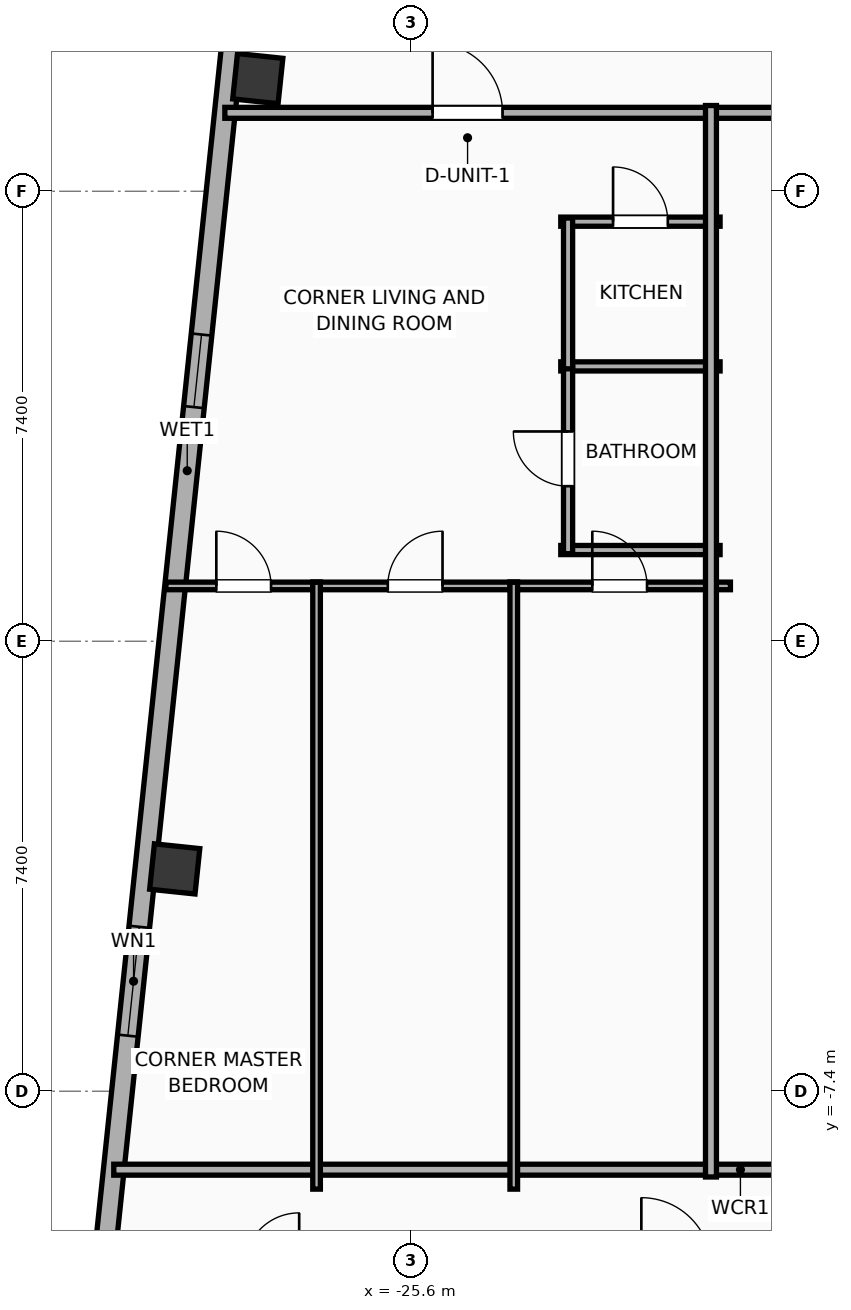
"""IFC4 building model, lengths in metres.
Left out: names, types, materials, properties, quantities, classifications, styles, units other than length and angle.
Written with IfcOpenShell. Run it as: python <this file> out.ifc"""

import sys

from ifc_helpers import new_model, si_unit, direction, frame, frame_2d, origin, origin_2d, place, context, subcontext, project, spatial, rectangle, hollow_rectangle, extrude, element, fill, save


model = new_model("IFC4")
c1 = context("Model", 3, precision=1e-05, world=origin(), true_north=direction((0.0, 1.0)))
c2 = subcontext(c1, "Body", "Model", "MODEL_VIEW")
j1 = project(units=[si_unit("LENGTHUNIT", "METRE"), si_unit("PLANEANGLEUNIT", "RADIAN")], contexts=[c1])
p1 = place(None, origin())
s1 = spatial("IfcSite", under=j1, at=p1, CompositionType="ELEMENT")
p2 = place(p1, origin())
s2 = spatial("IfcBuilding", under=s1, at=p2, CompositionType="ELEMENT")
p3 = place(p2, frame((0.0, 0.0, 267.8)))
s3 = spatial("IfcBuildingStorey", under=s2, at=p3, CompositionType="ELEMENT", Elevation=267.8)
for number, where, z_axis, x_axis in (
    (1, (-28.123, 9.252, 0.0), (0.0, 0.0, 1.0), (0.995, -0.105, 0.0)),
    (2, (-29.489, -3.744, 0.0), (0.0, 0.0, 1.0), (0.995, -0.105, 0.0)),
):
    element("IfcColumn", number, at=place(p3, frame(where, z_axis=z_axis, x_axis=x_axis)), inside=s3, PredefinedType="COLUMN", context=c2, shape_type="SweptSolid", body=[
        extrude(hollow_rectangle(XDim=0.75, YDim=0.75, WallThickness=0.025, at=origin_2d()), origin(), (0.0, 0.0, 1.0), 3.9),
    ])
p4 = place(p3, frame((-30.87, -12.296, 0.0), z_axis=(0.0, 0.0, 1.0), x_axis=(0.104533282919, 0.994521388791, 0.0)))
e3 = element("IfcWall", 3, at=p4, inside=s3, PredefinedType="ELEMENTEDWALL", context=c2, shape_type="SweptSolid", body=[
    extrude(rectangle(XDim=30.366, YDim=0.34, at=frame_2d((15.183, 0.0))), origin(), (0.0, 0.0, 1.0), 3.65),
])
p5 = place(p4, frame((5.842, 0.0, 0.75)))
e4 = element("IfcOpeningElement", 4, at=p5, cuts=e3, PredefinedType="OPENING", context=c2, shape_type="SweptSolid", body=[
    extrude(rectangle(XDim=1.8, YDim=2.1, at=frame_2d((0.9, 1.05))), frame((0.0, 0.18, 0.0), z_axis=(0.0, -1.0, 0.0), x_axis=(1.0, 0.0, 0.0)), (0.0, 0.0, 1.0), 0.36),
])
p6 = place(p4, frame((23.525, 0.0, 0.75)))
e5 = element("IfcOpeningElement", 5, at=p6, cuts=e3, PredefinedType="OPENING", context=c2, shape_type="SweptSolid", body=[
    extrude(rectangle(XDim=1.8, YDim=2.1, at=frame_2d((0.9, 1.05))), frame((0.0, 0.18, 0.0), z_axis=(0.0, -1.0, 0.0), x_axis=(1.0, 0.0, 0.0)), (0.0, 0.0, 1.0), 0.36),
])
p7 = place(p4, frame((27.117, 0.0, 0.75)))
e6 = element("IfcOpeningElement", 6, at=p7, cuts=e3, PredefinedType="OPENING", context=c2, shape_type="SweptSolid", body=[
    extrude(rectangle(XDim=1.2, YDim=2.05, at=frame_2d((0.6, 1.025))), frame((0.0, 0.18, 0.0), z_axis=(0.0, -1.0, 0.0), x_axis=(1.0, 0.0, 0.0)), (0.0, 0.0, 1.0), 0.36),
])
p8 = place(p4, frame((16.235, 0.0, 0.75)))
e7 = element("IfcOpeningElement", 7, at=p8, cuts=e3, PredefinedType="OPENING", context=c2, shape_type="SweptSolid", body=[
    extrude(rectangle(XDim=1.2, YDim=2.05, at=frame_2d((0.6, 1.025))), frame((0.0, 0.18, 0.0), z_axis=(0.0, -1.0, 0.0), x_axis=(1.0, 0.0, 0.0)), (0.0, 0.0, 1.0), 0.36),
])
p9 = place(p3, frame((-28.664, 8.69, 0.0), z_axis=(0.0, 0.0, 1.0), x_axis=(1.0, 0.0, 0.0)))
e8 = element("IfcWall", 8, at=p9, inside=s3, PredefinedType="PARTITIONING", context=c2, shape_type="SweptSolid", body=[
    extrude(rectangle(XDim=18.784, YDim=0.18, at=frame_2d((9.392, 0.0))), origin(), (0.0, 0.0, 1.0), 3.09),
])
p10 = place(p9, frame((3.417, 0.0, 0.0)))
e9 = element("IfcOpeningElement", 9, at=p10, cuts=e8, PredefinedType="OPENING", context=c2, shape_type="SweptSolid", body=[
    extrude(rectangle(XDim=1.15, YDim=2.05, at=frame_2d((0.575, 1.025))), frame((0.0, 0.1, 0.0), z_axis=(0.0, -1.0, 0.0), x_axis=(1.0, 0.0, 0.0)), (0.0, 0.0, 1.0), 0.2),
])
p11 = place(p3, frame((-30.491, -8.69, 0.0), z_axis=(0.0, 0.0, 1.0), x_axis=(1.0, 0.0, 0.0)))
e10 = element("IfcWall", 10, at=p11, inside=s3, PredefinedType="PARTITIONING", context=c2, shape_type="SweptSolid", body=[
    extrude(rectangle(XDim=20.611, YDim=0.18, at=frame_2d((10.306, 0.0))), origin(), (0.0, 0.0, 1.0), 3.65),
])
p12 = place(p3, frame((-23.14, 6.9, 0.0), z_axis=(0.0, 0.0, 1.0), x_axis=(1.0, 0.0, 0.0)))
e11 = element("IfcWall", 11, at=p12, inside=s3, PredefinedType="PLUMBINGWALL", context=c2, shape_type="SweptSolid", body=[
    extrude(rectangle(XDim=2.62, YDim=0.15, at=frame_2d((1.31, 0.0))), origin(), (0.0, 0.0, 1.0), 3.65),
])
p13 = place(p12, frame((0.86, 0.0, 0.0)))
e12 = element("IfcOpeningElement", 12, at=p13, cuts=e11, PredefinedType="OPENING", context=c2, shape_type="SweptSolid", body=[
    extrude(rectangle(XDim=0.9, YDim=2.05, at=frame_2d((0.45, 1.025))), frame((0.0, 0.085, 0.0), z_axis=(0.0, -1.0, 0.0), x_axis=(1.0, 0.0, 0.0)), (0.0, 0.0, 1.0), 0.17),
])
for number, where, z_axis, x_axis in (
    (13, (-23.14, 4.52, 0.0), (0.0, 0.0, 1.0), (1.0, 0.0, 0.0)),
    (14, (-23.14, 1.5, 0.0), (0.0, 0.0, 1.0), (1.0, 0.0, 0.0)),
):
    element("IfcWall", number, at=place(p3, frame(where, z_axis=z_axis, x_axis=x_axis)), inside=s3, PredefinedType="PLUMBINGWALL", context=c2, shape_type="SweptSolid", body=[
        extrude(rectangle(XDim=2.62, YDim=0.15, at=frame_2d((1.31, 0.0))), origin(), (0.0, 0.0, 1.0), 3.65),
    ])
p14 = place(p3, frame((-23.02, 1.44, 0.0), z_axis=(0.0, 0.0, 1.0), x_axis=(0.0, 1.0, 0.0)))
e15 = element("IfcWall", 15, at=p14, inside=s3, PredefinedType="PLUMBINGWALL", context=c2, shape_type="SweptSolid", body=[
    extrude(rectangle(XDim=3.12, YDim=0.15, at=frame_2d((1.56, 0.0))), origin(), (0.0, 0.0, 1.0), 3.65),
])
p15 = place(p14, frame((1.11, 0.0, 0.0)))
e16 = element("IfcOpeningElement", 16, at=p15, cuts=e15, PredefinedType="OPENING", context=c2, shape_type="SweptSolid", body=[
    extrude(rectangle(XDim=0.9, YDim=2.05, at=frame_2d((0.45, 1.025))), frame((0.0, 0.085, 0.0), z_axis=(0.0, -1.0, 0.0), x_axis=(1.0, 0.0, 0.0)), (0.0, 0.0, 1.0), 0.17),
])
p16 = place(p3, frame((-23.02, 4.48, 0.0), z_axis=(0.0, 0.0, 1.0), x_axis=(0.0, 1.0, 0.0)))
e17 = element("IfcWall", 17, at=p16, inside=s3, PredefinedType="PLUMBINGWALL", context=c2, shape_type="SweptSolid", body=[
    extrude(rectangle(XDim=2.48, YDim=0.15, at=frame_2d((1.24, 0.0))), origin(), (0.0, 0.0, 1.0), 3.65),
])
p17 = place(p3, frame((-29.633, 0.91, 0.0), z_axis=(0.0, 0.0, 1.0), x_axis=(1.0, 0.0, 0.0)))
e18 = element("IfcWall", 18, at=p17, inside=s3, PredefinedType="PARTITIONING", context=c2, shape_type="SweptSolid", body=[
    extrude(rectangle(XDim=2.54, YDim=0.125, at=frame_2d((1.27, 0.0))), origin(), (0.0, 0.0, 1.0), 3.65),
])
p18 = place(p17, frame((0.829, 0.0, 0.0)))
e19 = element("IfcOpeningElement", 19, at=p18, cuts=e18, PredefinedType="OPENING", context=c2, shape_type="SweptSolid", body=[
    extrude(rectangle(XDim=0.9, YDim=2.05, at=frame_2d((0.45, 1.025))), frame((0.0, 0.073, 0.0), z_axis=(0.0, -1.0, 0.0), x_axis=(1.0, 0.0, 0.0)), (0.0, 0.0, 1.0), 0.145),
])
p19 = place(p3, frame((-27.219, 0.91, 0.0), z_axis=(0.0, 0.0, 1.0), x_axis=(1.0, 0.0, 0.0)))
e20 = element("IfcWall", 20, at=p19, inside=s3, PredefinedType="PARTITIONING", context=c2, shape_type="SweptSolid", body=[
    extrude(rectangle(XDim=3.368, YDim=0.125, at=frame_2d((1.684, 0.0))), origin(), (0.0, 0.0, 1.0), 3.65),
])
p20 = place(p19, frame((1.234, 0.0, 0.0)))
e21 = element("IfcOpeningElement", 21, at=p20, cuts=e20, PredefinedType="OPENING", context=c2, shape_type="SweptSolid", body=[
    extrude(rectangle(XDim=0.9, YDim=2.05, at=frame_2d((0.45, 1.025))), frame((0.0, 0.073, 0.0), z_axis=(0.0, -1.0, 0.0), x_axis=(1.0, 0.0, 0.0)), (0.0, 0.0, 1.0), 0.145),
])
p21 = place(p3, frame((-23.976, 0.91, 0.0), z_axis=(0.0, 0.0, 1.0), x_axis=(1.0, 0.0, 0.0)))
e22 = element("IfcWall", 22, at=p21, inside=s3, PredefinedType="PARTITIONING", context=c2, shape_type="SweptSolid", body=[
    extrude(rectangle(XDim=3.625, YDim=0.125, at=frame_2d((1.813, 0.0))), origin(), (0.0, 0.0, 1.0), 3.65),
])
p22 = place(p21, frame((1.354, 0.0, 0.0)))
e23 = element("IfcOpeningElement", 23, at=p22, cuts=e22, PredefinedType="OPENING", context=c2, shape_type="SweptSolid", body=[
    extrude(rectangle(XDim=0.9, YDim=2.05, at=frame_2d((0.45, 1.025))), frame((0.0, 0.073, 0.0), z_axis=(0.0, -1.0, 0.0), x_axis=(1.0, 0.0, 0.0)), (0.0, 0.0, 1.0), 0.145),
])
for number, where, z_axis, x_axis in (
    (24, (-23.913, -9.01, 0.0), (0.0, 0.0, 1.0), (0.0, 1.0, 0.0)),
    (25, (-27.156, -9.01, 0.0), (0.0, 0.0, 1.0), (0.0, 1.0, 0.0)),
):
    element("IfcWall", number, at=place(p3, frame(where, z_axis=z_axis, x_axis=x_axis)), inside=s3, PredefinedType="PARTITIONING", context=c2, shape_type="SweptSolid", body=[
        extrude(rectangle(XDim=9.98, YDim=0.125, at=frame_2d((4.99, 0.0))), origin(), (0.0, 0.0, 1.0), 3.65),
    ])
p23 = place(p3, frame((-20.67, -8.81, 0.0), z_axis=(0.0, 0.0, 1.0), x_axis=(0.0, 1.0, 0.0)))
e26 = element("IfcWall", 26, at=p23, inside=s3, PredefinedType="PARTITIONING", context=c2, shape_type="SweptSolid", body=[
    extrude(rectangle(XDim=17.62, YDim=0.18, at=frame_2d((8.81, 0.0))), origin(), (0.0, 0.0, 1.0), 3.65),
])
p24 = place(p5, origin())
e27 = element("IfcWindow", 27, at=p24, inside=s3, PartitioningType="SINGLE_PANEL", PredefinedType="WINDOW", context=c2, shape_type="SweptSolid", body=[
    extrude(rectangle(XDim=1.8, YDim=2.1, at=frame_2d((0.9, 1.05))), frame((0.0, 0.03, 0.0), z_axis=(0.0, -1.0, 0.0), x_axis=(1.0, 0.0, 0.0)), (0.0, 0.0, 1.0), 0.06),
])
fill(e4, e27)
p25 = place(p8, origin())
e28 = element("IfcWindow", 28, at=p25, inside=s3, PartitioningType="SINGLE_PANEL", PredefinedType="WINDOW", context=c2, shape_type="SweptSolid", body=[
    extrude(rectangle(XDim=1.2, YDim=2.05, at=frame_2d((0.6, 1.025))), frame((0.0, 0.03, 0.0), z_axis=(0.0, -1.0, 0.0), x_axis=(1.0, 0.0, 0.0)), (0.0, 0.0, 1.0), 0.06),
])
fill(e7, e28)
p26 = place(p10, origin())
e29 = element("IfcDoor", 29, at=p26, inside=s3, OperationType="SINGLE_SWING_LEFT", PredefinedType="DOOR", context=c2, shape_type="SweptSolid", body=[
    extrude(rectangle(XDim=1.15, YDim=2.05, at=frame_2d((0.575, 1.025))), frame((0.0, 0.025, 0.0), z_axis=(0.0, -1.0, 0.0), x_axis=(1.0, 0.0, 0.0)), (0.0, 0.0, 1.0), 0.05),
])
fill(e9, e29)
p27 = place(p13, origin())
e30 = element("IfcDoor", 30, at=p27, inside=s3, OperationType="SINGLE_SWING_LEFT", PredefinedType="DOOR", context=c2, shape_type="SweptSolid", body=[
    extrude(rectangle(XDim=0.9, YDim=2.05, at=frame_2d((0.45, 1.025))), frame((0.0, 0.025, 0.0), z_axis=(0.0, -1.0, 0.0), x_axis=(1.0, 0.0, 0.0)), (0.0, 0.0, 1.0), 0.05),
])
fill(e12, e30)
p28 = place(p15, origin())
e31 = element("IfcDoor", 31, at=p28, inside=s3, OperationType="SINGLE_SWING_RIGHT", PredefinedType="DOOR", context=c2, shape_type="SweptSolid", body=[
    extrude(rectangle(XDim=0.9, YDim=2.05, at=frame_2d((0.45, 1.025))), frame((0.0, 0.025, 0.0), z_axis=(0.0, -1.0, 0.0), x_axis=(1.0, 0.0, 0.0)), (0.0, 0.0, 1.0), 0.05),
])
fill(e16, e31)
p29 = place(p18, origin())
e32 = element("IfcDoor", 32, at=p29, inside=s3, OperationType="SINGLE_SWING_LEFT", PredefinedType="DOOR", context=c2, shape_type="SweptSolid", body=[
    extrude(rectangle(XDim=0.9, YDim=2.05, at=frame_2d((0.45, 1.025))), frame((0.0, 0.025, 0.0), z_axis=(0.0, -1.0, 0.0), x_axis=(1.0, 0.0, 0.0)), (0.0, 0.0, 1.0), 0.05),
])
fill(e19, e32)
p30 = place(p20, origin())
e33 = element("IfcDoor", 33, at=p30, inside=s3, OperationType="SINGLE_SWING_RIGHT", PredefinedType="DOOR", context=c2, shape_type="SweptSolid", body=[
    extrude(rectangle(XDim=0.9, YDim=2.05, at=frame_2d((0.45, 1.025))), frame((0.0, 0.025, 0.0), z_axis=(0.0, -1.0, 0.0), x_axis=(1.0, 0.0, 0.0)), (0.0, 0.0, 1.0), 0.05),
])
fill(e21, e33)
p31 = place(p22, origin())
e34 = element("IfcDoor", 34, at=p31, inside=s3, OperationType="SINGLE_SWING_LEFT", PredefinedType="DOOR", context=c2, shape_type="SweptSolid", body=[
    extrude(rectangle(XDim=0.9, YDim=2.05, at=frame_2d((0.45, 1.025))), frame((0.0, 0.025, 0.0), z_axis=(0.0, -1.0, 0.0), x_axis=(1.0, 0.0, 0.0)), (0.0, 0.0, 1.0), 0.05),
])
fill(e23, e34)
save(model, sys.argv[1])
